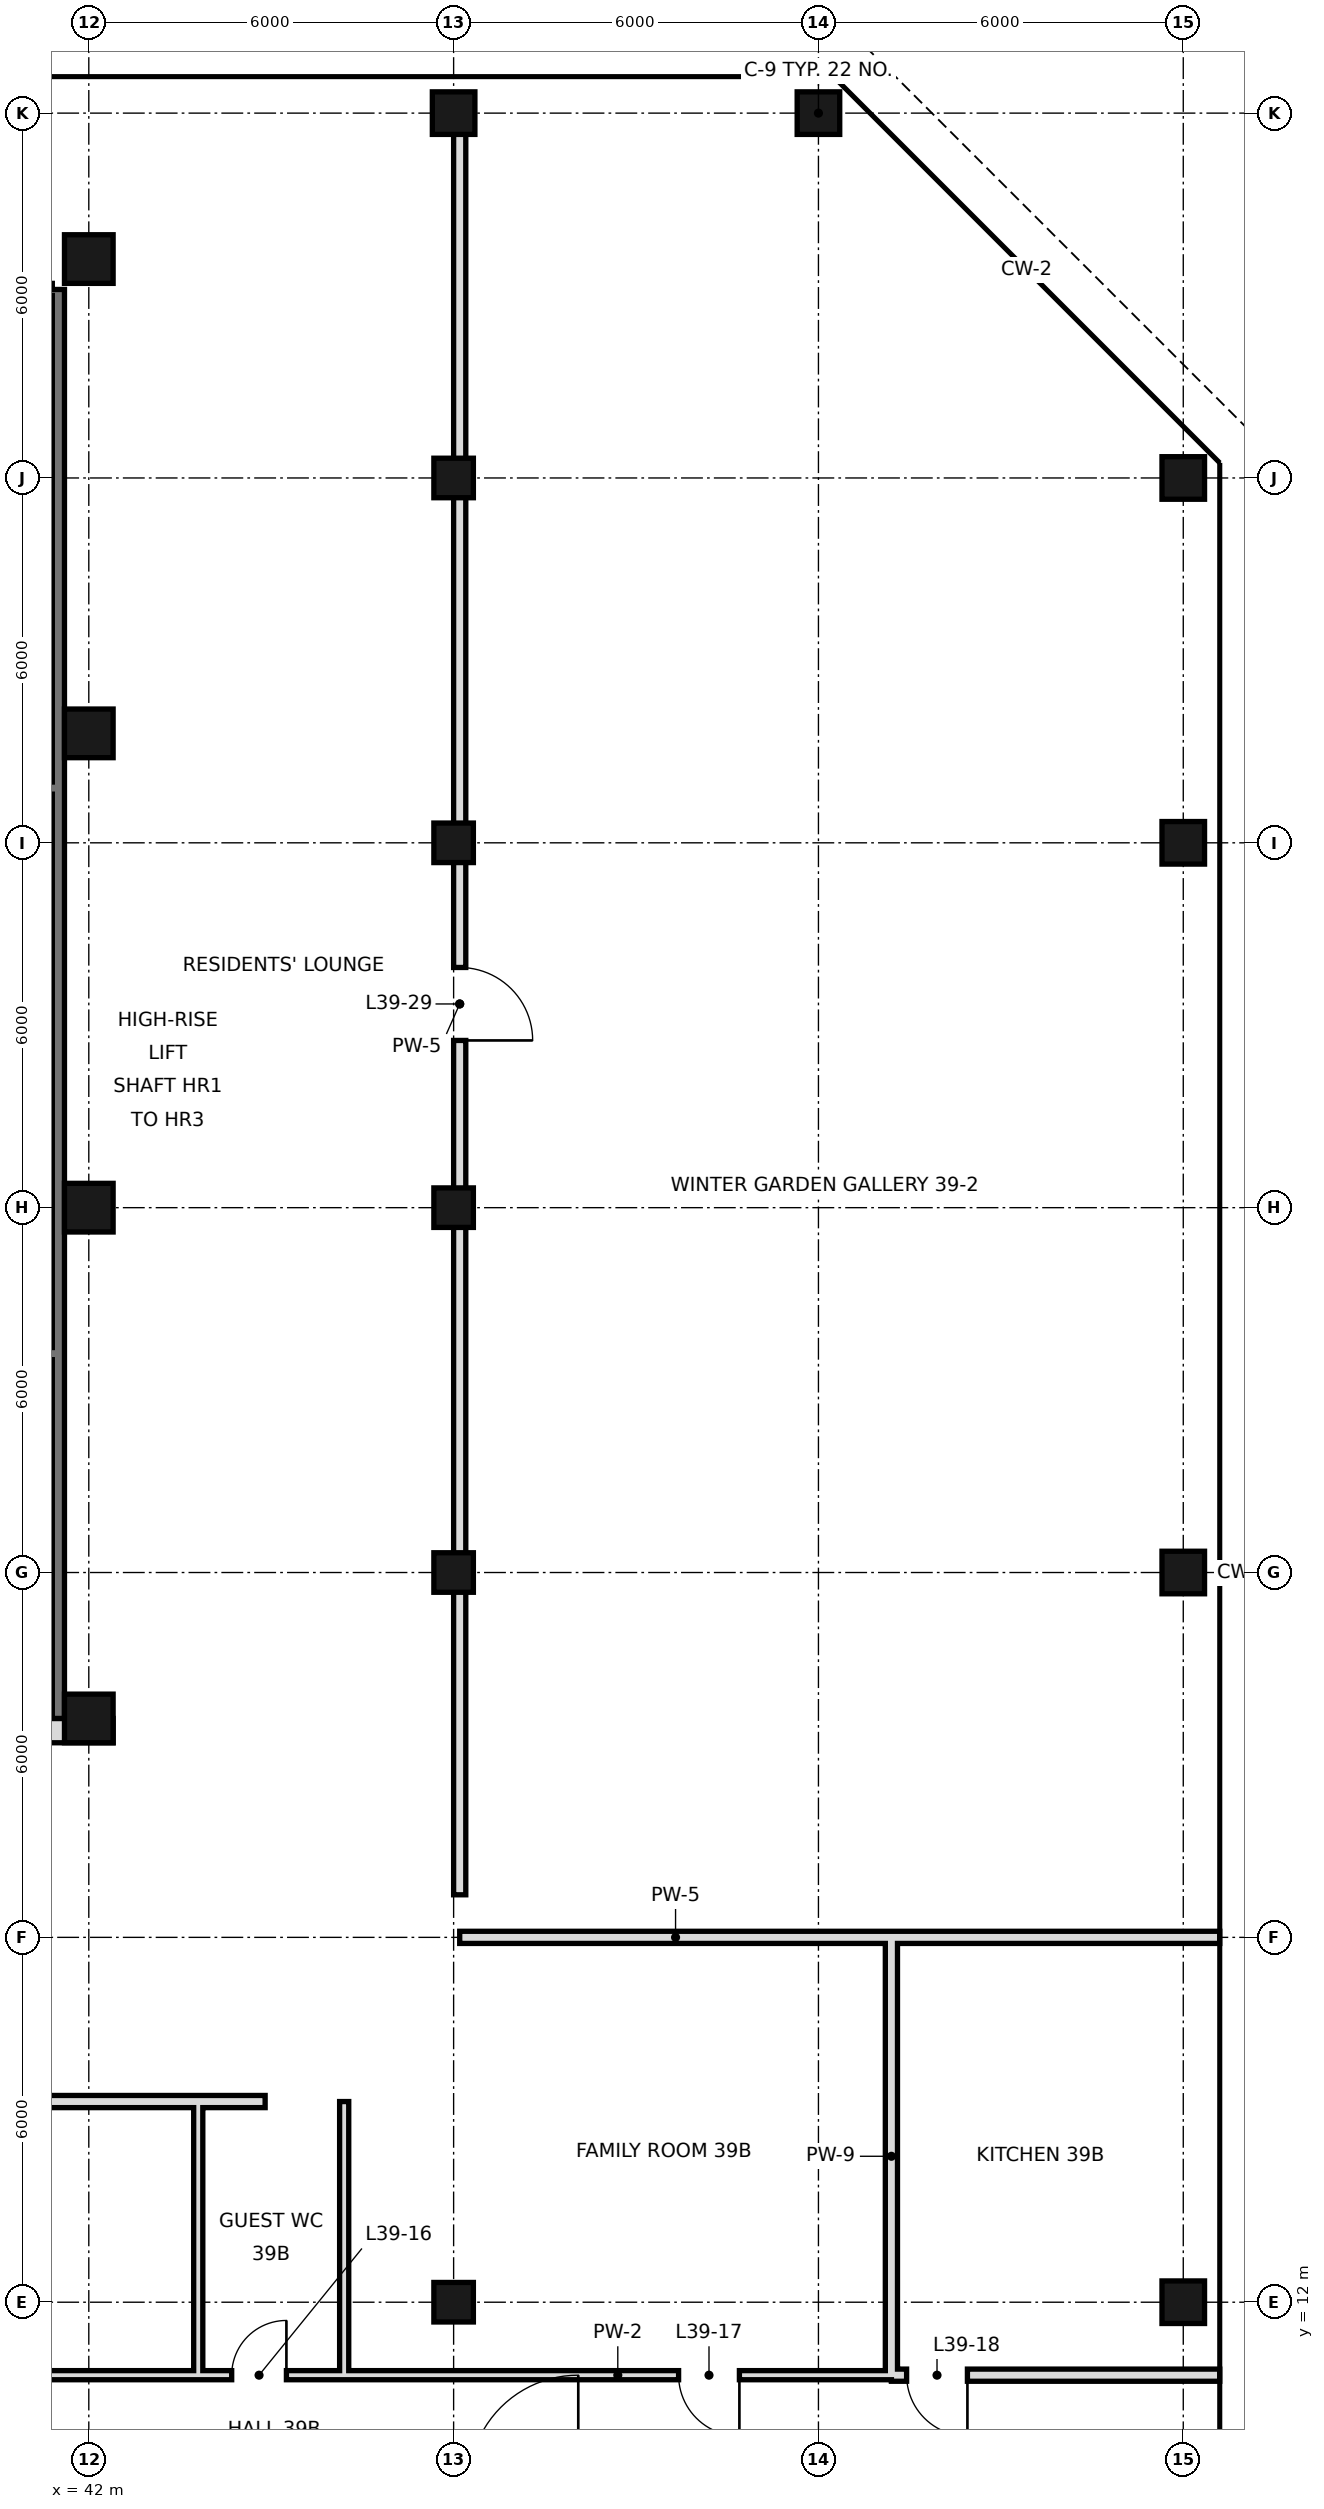
"""IFC4 building model, lengths in metres.
Left out: names, types, materials, properties, quantities, classifications, styles, units other than length and angle.
Written with IfcOpenShell. Run it as: python <this file> out.ifc"""

import sys

from ifc_helpers import new_model, si_unit, direction, frame, frame_2d, origin, origin_2d, place, context, subcontext, project, spatial, rectangle, hollow_rectangle, extrude, element, fill, save


model = new_model("IFC4")
c1 = context("Model", 3, precision=1e-05, world=origin(), true_north=direction((0.0, 1.0)))
c2 = subcontext(c1, "Body", "Model", "MODEL_VIEW")
j1 = project(units=[si_unit("LENGTHUNIT", "METRE"), si_unit("PLANEANGLEUNIT", "RADIAN")], contexts=[c1])
p1 = place(None, origin())
s1 = spatial("IfcSite", under=j1, at=p1, CompositionType="ELEMENT")
p2 = place(p1, origin())
s2 = spatial("IfcBuilding", under=s1, at=p2, CompositionType="ELEMENT")
p3 = place(p2, frame((0.0, 0.0, 170.8)))
s3 = spatial("IfcBuildingStorey", under=s2, at=p3, CompositionType="ELEMENT", Elevation=170.8)
for number, where, z_axis, x_axis in (
    (1, (42.0, 21.6, 0.0), (0.0, 0.0, 1.0), (1.0, 0.0, 0.0)),
    (2, (42.0, 30.0, 0.0), (0.0, 0.0, 1.0), (1.0, 0.0, 0.0)),
    (3, (42.0, 37.8, 0.0), (0.0, 0.0, 1.0), (1.0, 0.0, 0.0)),
    (4, (42.0, 45.6, 0.0), (0.0, 0.0, 1.0), (1.0, 0.0, 0.0)),
):
    element("IfcColumn", number, at=place(p3, frame(where, z_axis=z_axis, x_axis=x_axis)), inside=s3, PredefinedType="COLUMN", context=c2, shape_type="SweptSolid", body=[
        extrude(hollow_rectangle(XDim=0.8, YDim=0.8, WallThickness=0.045, at=origin_2d()), origin(), (0.0, 0.0, 1.0), 3.6),
    ])
for number, where, z_axis, x_axis in (
    (5, (48.0, 12.0, 0.0), (0.0, 0.0, 1.0), (1.0, 0.0, 0.0)),
    (6, (48.0, 24.0, 0.0), (0.0, 0.0, 1.0), (1.0, 0.0, 0.0)),
    (7, (48.0, 30.0, 0.0), (0.0, 0.0, 1.0), (1.0, 0.0, 0.0)),
    (8, (48.0, 36.0, 0.0), (0.0, 0.0, 1.0), (1.0, 0.0, 0.0)),
    (9, (48.0, 42.0, 0.0), (0.0, 0.0, 1.0), (1.0, 0.0, 0.0)),
):
    element("IfcColumn", number, at=place(p3, frame(where, z_axis=z_axis, x_axis=x_axis)), inside=s3, PredefinedType="COLUMN", context=c2, shape_type="SweptSolid", body=[
        extrude(hollow_rectangle(XDim=0.65, YDim=0.65, WallThickness=0.032, at=origin_2d()), origin(), (0.0, 0.0, 1.0), 3.6),
    ])
for number, where, z_axis, x_axis in (
    (10, (48.0, 48.0, 0.0), (0.0, 0.0, 1.0), (1.0, 0.0, 0.0)),
    (11, (54.0, 48.0, 0.0), (0.0, 0.0, 1.0), (1.0, 0.0, 0.0)),
    (12, (60.0, 12.0, 0.0), (0.0, 0.0, 1.0), (1.0, 0.0, 0.0)),
    (13, (60.0, 24.0, 0.0), (0.0, 0.0, 1.0), (1.0, 0.0, 0.0)),
    (14, (60.0, 36.0, 0.0), (0.0, 0.0, 1.0), (1.0, 0.0, 0.0)),
    (15, (60.0, 42.0, 0.0), (0.0, 0.0, 1.0), (1.0, 0.0, 0.0)),
):
    element("IfcColumn", number, at=place(p3, frame(where, z_axis=z_axis, x_axis=x_axis)), inside=s3, PredefinedType="COLUMN", context=c2, shape_type="SweptSolid", body=[
        extrude(hollow_rectangle(XDim=0.7, YDim=0.7, WallThickness=0.036, at=origin_2d()), origin(), (0.0, 0.0, 1.0), 3.6),
    ])
for number, where, z_axis, x_axis in (
    (16, (43.8, 10.8, 0.0), (0.0, 0.0, 1.0), (0.0, 1.0, 0.0)),
    (17, (46.2, 10.8, 0.0), (0.0, 0.0, 1.0), (0.0, 1.0, 0.0)),
):
    element("IfcWall", number, at=place(p3, frame(where, z_axis=z_axis, x_axis=x_axis)), inside=s3, PredefinedType="PARTITIONING", context=c2, shape_type="SweptSolid", body=[
        extrude(rectangle(XDim=4.5, YDim=0.15, at=frame_2d((2.25, 0.0))), origin(), (0.0, 0.0, 1.0), 3.42),
    ])
p4 = place(p3, frame((48.1, 18.7, 0.0), z_axis=(0.0, 0.0, 1.0), x_axis=(0.0, 1.0, 0.0)))
e18 = element("IfcWall", 18, at=p4, inside=s3, PredefinedType="SOLIDWALL", context=c2, shape_type="SweptSolid", body=[
    extrude(rectangle(XDim=29.3, YDim=0.2, at=frame_2d((14.65, 0.0))), origin(), (0.0, 0.0, 1.0), 2.72),
])
p5 = place(p4, frame((14.05, 0.0, 0.0)))
e19 = element("IfcOpeningElement", 19, at=p5, cuts=e18, PredefinedType="OPENING", context=c2, shape_type="SweptSolid", body=[
    extrude(rectangle(XDim=1.2, YDim=2.4, at=frame_2d((0.6, 1.2))), frame((0.0, 0.11, 0.0), z_axis=(0.0, -1.0, 0.0), x_axis=(1.0, 0.0, 0.0)), (0.0, 0.0, 1.0), 0.22),
])
p6 = place(p3, frame((55.2, 10.8, 0.0), z_axis=(0.0, 0.0, 1.0), x_axis=(0.0, 1.0, 0.0)))
e20 = element("IfcWall", 20, at=p6, inside=s3, PredefinedType="SOLIDWALL", context=c2, shape_type="SweptSolid", body=[
    extrude(rectangle(XDim=7.2, YDim=0.2, at=frame_2d((3.6, 0.0))), origin(), (0.0, 0.0, 1.0), 2.72),
])
p7 = place(p3, frame((55.2, 10.8, 0.0), z_axis=(0.0, 0.0, 1.0), x_axis=(1.0, 0.0, 0.0)))
e21 = element("IfcWall", 21, at=p7, inside=s3, PredefinedType="SOLIDWALL", context=c2, shape_type="SweptSolid", body=[
    extrude(rectangle(XDim=5.4, YDim=0.2, at=frame_2d((2.7, 0.0))), origin(), (0.0, 0.0, 1.0), 2.97),
])
p8 = place(p7, frame((0.25, 0.0, 0.0)))
e22 = element("IfcOpeningElement", 22, at=p8, cuts=e21, PredefinedType="OPENING", context=c2, shape_type="SweptSolid", body=[
    extrude(rectangle(XDim=1.0, YDim=2.4, at=frame_2d((0.5, 1.2))), frame((0.0, 0.11, 0.0), z_axis=(0.0, -1.0, 0.0), x_axis=(1.0, 0.0, 0.0)), (0.0, 0.0, 1.0), 0.22),
])
p9 = place(p3, frame((24.0, 10.8, 0.0), z_axis=(0.0, 0.0, 1.0), x_axis=(1.0, 0.0, 0.0)))
e23 = element("IfcWall", 23, at=p9, inside=s3, PredefinedType="PARTITIONING", context=c2, shape_type="SweptSolid", body=[
    extrude(rectangle(XDim=19.8, YDim=0.15, at=frame_2d((9.9, 0.0))), origin(), (0.0, 0.0, 1.0), 3.42),
])
p10 = place(p9, frame((2.5, 0.0, 0.0)))
e24 = element("IfcOpeningElement", 24, at=p10, cuts=e23, PredefinedType="OPENING", context=c2, shape_type="SweptSolid", body=[
    extrude(rectangle(XDim=1.0, YDim=2.4, at=frame_2d((0.5, 1.2))), frame((0.0, 0.085, 0.0), z_axis=(0.0, -1.0, 0.0), x_axis=(1.0, 0.0, 0.0)), (0.0, 0.0, 1.0), 0.17),
])
p11 = place(p9, frame((8.56, 0.0, 0.0)))
e25 = element("IfcOpeningElement", 25, at=p11, cuts=e23, PredefinedType="OPENING", context=c2, shape_type="SweptSolid", body=[
    extrude(rectangle(XDim=1.0, YDim=2.4, at=frame_2d((0.5, 1.2))), frame((0.0, 0.085, 0.0), z_axis=(0.0, -1.0, 0.0), x_axis=(1.0, 0.0, 0.0)), (0.0, 0.0, 1.0), 0.17),
])
p12 = place(p9, frame((16.3, 0.0, 0.0)))
e26 = element("IfcOpeningElement", 26, at=p12, cuts=e23, PredefinedType="OPENING", context=c2, shape_type="SweptSolid", body=[
    extrude(rectangle(XDim=1.0, YDim=2.4, at=frame_2d((0.5, 1.2))), frame((0.0, 0.085, 0.0), z_axis=(0.0, -1.0, 0.0), x_axis=(1.0, 0.0, 0.0)), (0.0, 0.0, 1.0), 0.17),
])
p13 = place(p3, frame((46.2, 10.8, 0.0), z_axis=(0.0, 0.0, 1.0), x_axis=(1.0, 0.0, 0.0)))
e27 = element("IfcWall", 27, at=p13, inside=s3, PredefinedType="PARTITIONING", context=c2, shape_type="SweptSolid", body=[
    extrude(rectangle(XDim=9.0, YDim=0.15, at=frame_2d((4.5, 0.0))), origin(), (0.0, 0.0, 1.0), 3.42),
])
p14 = place(p13, frame((5.5, 0.0, 0.0)))
e28 = element("IfcOpeningElement", 28, at=p14, cuts=e27, PredefinedType="OPENING", context=c2, shape_type="SweptSolid", body=[
    extrude(rectangle(XDim=1.0, YDim=2.4, at=frame_2d((0.5, 1.2))), frame((0.0, 0.085, 0.0), z_axis=(0.0, -1.0, 0.0), x_axis=(1.0, 0.0, 0.0)), (0.0, 0.0, 1.0), 0.17),
])
p15 = place(p3, frame((43.8, 10.8, 0.0), z_axis=(0.0, 0.0, 1.0), x_axis=(1.0, 0.0, 0.0)))
e29 = element("IfcWall", 29, at=p15, inside=s3, PredefinedType="PARTITIONING", context=c2, shape_type="SweptSolid", body=[
    extrude(rectangle(XDim=2.4, YDim=0.15, at=frame_2d((1.2, 0.0))), origin(), (0.0, 0.0, 1.0), 3.42),
])
p16 = place(p15, frame((0.55, 0.0, 0.0)))
e30 = element("IfcOpeningElement", 30, at=p16, cuts=e29, PredefinedType="OPENING", context=c2, shape_type="SweptSolid", body=[
    extrude(rectangle(XDim=0.9, YDim=2.4, at=frame_2d((0.45, 1.2))), frame((0.0, 0.085, 0.0), z_axis=(0.0, -1.0, 0.0), x_axis=(1.0, 0.0, 0.0)), (0.0, 0.0, 1.0), 0.17),
])
p17 = place(p3, frame((24.0, 15.3, 0.0), z_axis=(0.0, 0.0, 1.0), x_axis=(1.0, 0.0, 0.0)))
e31 = element("IfcWall", 31, at=p17, inside=s3, PredefinedType="SOLIDWALL", context=c2, shape_type="SweptSolid", body=[
    extrude(rectangle(XDim=20.9, YDim=0.2, at=frame_2d((10.45, 0.0))), origin(), (0.0, 0.0, 1.0), 2.72),
])
p18 = place(p17, frame((3.26, 0.0, 0.0)))
e32 = element("IfcOpeningElement", 32, at=p18, cuts=e31, PredefinedType="OPENING", context=c2, shape_type="SweptSolid", body=[
    extrude(rectangle(XDim=1.2, YDim=2.4, at=frame_2d((0.6, 1.2))), frame((0.0, 0.11, 0.0), z_axis=(0.0, -1.0, 0.0), x_axis=(1.0, 0.0, 0.0)), (0.0, 0.0, 1.0), 0.22),
])
p19 = place(p17, frame((7.18, 0.0, 0.0)))
e33 = element("IfcOpeningElement", 33, at=p19, cuts=e31, PredefinedType="OPENING", context=c2, shape_type="SweptSolid", body=[
    extrude(rectangle(XDim=1.2, YDim=2.4, at=frame_2d((0.6, 1.2))), frame((0.0, 0.11, 0.0), z_axis=(0.0, -1.0, 0.0), x_axis=(1.0, 0.0, 0.0)), (0.0, 0.0, 1.0), 0.22),
])
p20 = place(p3, frame((48.1, 18.0, 0.0), z_axis=(0.0, 0.0, 1.0), x_axis=(1.0, 0.0, 0.0)))
e34 = element("IfcWall", 34, at=p20, inside=s3, PredefinedType="SOLIDWALL", context=c2, shape_type="SweptSolid", body=[
    extrude(rectangle(XDim=7.1, YDim=0.2, at=frame_2d((3.55, 0.0))), origin(), (0.0, 0.0, 1.0), 2.72),
])
p21 = place(p3, frame((55.2, 18.0, 0.0), z_axis=(0.0, 0.0, 1.0), x_axis=(1.0, 0.0, 0.0)))
e35 = element("IfcWall", 35, at=p21, inside=s3, PredefinedType="SOLIDWALL", context=c2, shape_type="SweptSolid", body=[
    extrude(rectangle(XDim=5.4, YDim=0.2, at=frame_2d((2.7, 0.0))), origin(), (0.0, 0.0, 1.0), 2.72),
])
p22 = place(p3, frame((41.5, 21.6, 0.0), z_axis=(0.0, 0.0, 1.0), x_axis=(0.0, 1.0, 0.0)))
e36 = element("IfcWall", 36, at=p22, inside=s3, PredefinedType="SOLIDWALL", context=c2, shape_type="SweptSolid", body=[
    extrude(rectangle(XDim=23.5, YDim=0.2, at=frame_2d((11.75, 0.0))), origin(), (0.0, 0.0, 1.0), 3.42),
])
p23 = place(p3, frame((5.6, 21.4, 0.0), z_axis=(0.0, 0.0, 1.0), x_axis=(1.0, 0.0, 0.0)))
e37 = element("IfcWall", 37, at=p23, inside=s3, PredefinedType="SOLIDWALL", context=c2, shape_type="SweptSolid", body=[
    extrude(rectangle(XDim=36.8, YDim=0.4, at=frame_2d((18.4, 0.0))), origin(), (0.0, 0.0, 1.0), 3.42),
])
p24 = place(p23, frame((8.5, 0.0, 0.0)))
e38 = element("IfcOpeningElement", 38, at=p24, cuts=e37, PredefinedType="OPENING", context=c2, shape_type="SweptSolid", body=[
    extrude(rectangle(XDim=1.8, YDim=2.1, at=frame_2d((0.9, 1.05))), frame((0.0, 0.21, 0.0), z_axis=(0.0, -1.0, 0.0), x_axis=(1.0, 0.0, 0.0)), (0.0, 0.0, 1.0), 0.42),
])
p25 = place(p23, frame((17.5, 0.0, 0.0)))
e39 = element("IfcOpeningElement", 39, at=p25, cuts=e37, PredefinedType="OPENING", context=c2, shape_type="SweptSolid", body=[
    extrude(rectangle(XDim=1.8, YDim=2.1, at=frame_2d((0.9, 1.05))), frame((0.0, 0.21, 0.0), z_axis=(0.0, -1.0, 0.0), x_axis=(1.0, 0.0, 0.0)), (0.0, 0.0, 1.0), 0.42),
])
p26 = place(p23, frame((26.5, 0.0, 0.0)))
e40 = element("IfcOpeningElement", 40, at=p26, cuts=e37, PredefinedType="OPENING", context=c2, shape_type="SweptSolid", body=[
    extrude(rectangle(XDim=1.8, YDim=2.1, at=frame_2d((0.9, 1.05))), frame((0.0, 0.21, 0.0), z_axis=(0.0, -1.0, 0.0), x_axis=(1.0, 0.0, 0.0)), (0.0, 0.0, 1.0), 0.42),
])
p27 = place(p23, frame((4.5, 0.0, 0.0)))
e41 = element("IfcOpeningElement", 41, at=p27, cuts=e37, PredefinedType="OPENING", context=c2, shape_type="SweptSolid", body=[
    extrude(rectangle(XDim=1.2, YDim=2.1, at=frame_2d((0.6, 1.05))), frame((0.0, 0.21, 0.0), z_axis=(0.0, -1.0, 0.0), x_axis=(1.0, 0.0, 0.0)), (0.0, 0.0, 1.0), 0.42),
])
p28 = place(p23, frame((31.1, 0.0, 0.0)))
e42 = element("IfcOpeningElement", 42, at=p28, cuts=e37, PredefinedType="OPENING", context=c2, shape_type="SweptSolid", body=[
    extrude(rectangle(XDim=1.2, YDim=2.1, at=frame_2d((0.6, 1.05))), frame((0.0, 0.21, 0.0), z_axis=(0.0, -1.0, 0.0), x_axis=(1.0, 0.0, 0.0)), (0.0, 0.0, 1.0), 0.42),
])
p29 = place(p3, frame((38.7, 36.9, 0.0), z_axis=(0.0, 0.0, 1.0), x_axis=(1.0, 0.0, 0.0)))
e43 = element("IfcWall", 43, at=p29, inside=s3, PredefinedType="SOLIDWALL", context=c2, shape_type="SweptSolid", body=[
    extrude(rectangle(XDim=2.7, YDim=0.2, at=frame_2d((1.35, 0.0))), origin(), (0.0, 0.0, 1.0), 3.42),
])
p30 = place(p16, frame((0.9, 0.0, 0.0), z_axis=(0.0, 0.0, 1.0), x_axis=(-1.0, 0.0, 0.0)))
e44 = element("IfcDoor", 44, at=p30, inside=s3, OperationType="SINGLE_SWING_LEFT", PredefinedType="DOOR", context=c2, shape_type="SweptSolid", body=[
    extrude(rectangle(XDim=0.9, YDim=2.4, at=frame_2d((0.45, 1.2))), frame((0.0, 0.025, 0.0), z_axis=(0.0, -1.0, 0.0), x_axis=(1.0, 0.0, 0.0)), (0.0, 0.0, 1.0), 0.05),
])
fill(e30, e44)
p31 = place(p14, origin())
e45 = element("IfcDoor", 45, at=p31, inside=s3, OperationType="SINGLE_SWING_RIGHT", PredefinedType="DOOR", context=c2, shape_type="SweptSolid", body=[
    extrude(rectangle(XDim=1.0, YDim=2.4, at=frame_2d((0.5, 1.2))), frame((0.0, 0.025, 0.0), z_axis=(0.0, -1.0, 0.0), x_axis=(1.0, 0.0, 0.0)), (0.0, 0.0, 1.0), 0.05),
])
fill(e28, e45)
p32 = place(p8, origin())
e46 = element("IfcDoor", 46, at=p32, inside=s3, OperationType="SINGLE_SWING_RIGHT", PredefinedType="DOOR", context=c2, shape_type="SweptSolid", body=[
    extrude(rectangle(XDim=1.0, YDim=2.4, at=frame_2d((0.5, 1.2))), frame((0.0, 0.025, 0.0), z_axis=(0.0, -1.0, 0.0), x_axis=(1.0, 0.0, 0.0)), (0.0, 0.0, 1.0), 0.05),
])
fill(e22, e46)
p33 = place(p5, frame((1.2, 0.0, 0.0), z_axis=(0.0, 0.0, 1.0), x_axis=(-1.0, 0.0, 0.0)))
e47 = element("IfcDoor", 47, at=p33, inside=s3, OperationType="SINGLE_SWING_RIGHT", PredefinedType="DOOR", context=c2, shape_type="SweptSolid", body=[
    extrude(rectangle(XDim=1.2, YDim=2.4, at=frame_2d((0.6, 1.2))), frame((0.0, 0.025, 0.0), z_axis=(0.0, -1.0, 0.0), x_axis=(1.0, 0.0, 0.0)), (0.0, 0.0, 1.0), 0.05),
])
fill(e19, e47)
save(model, sys.argv[1])
